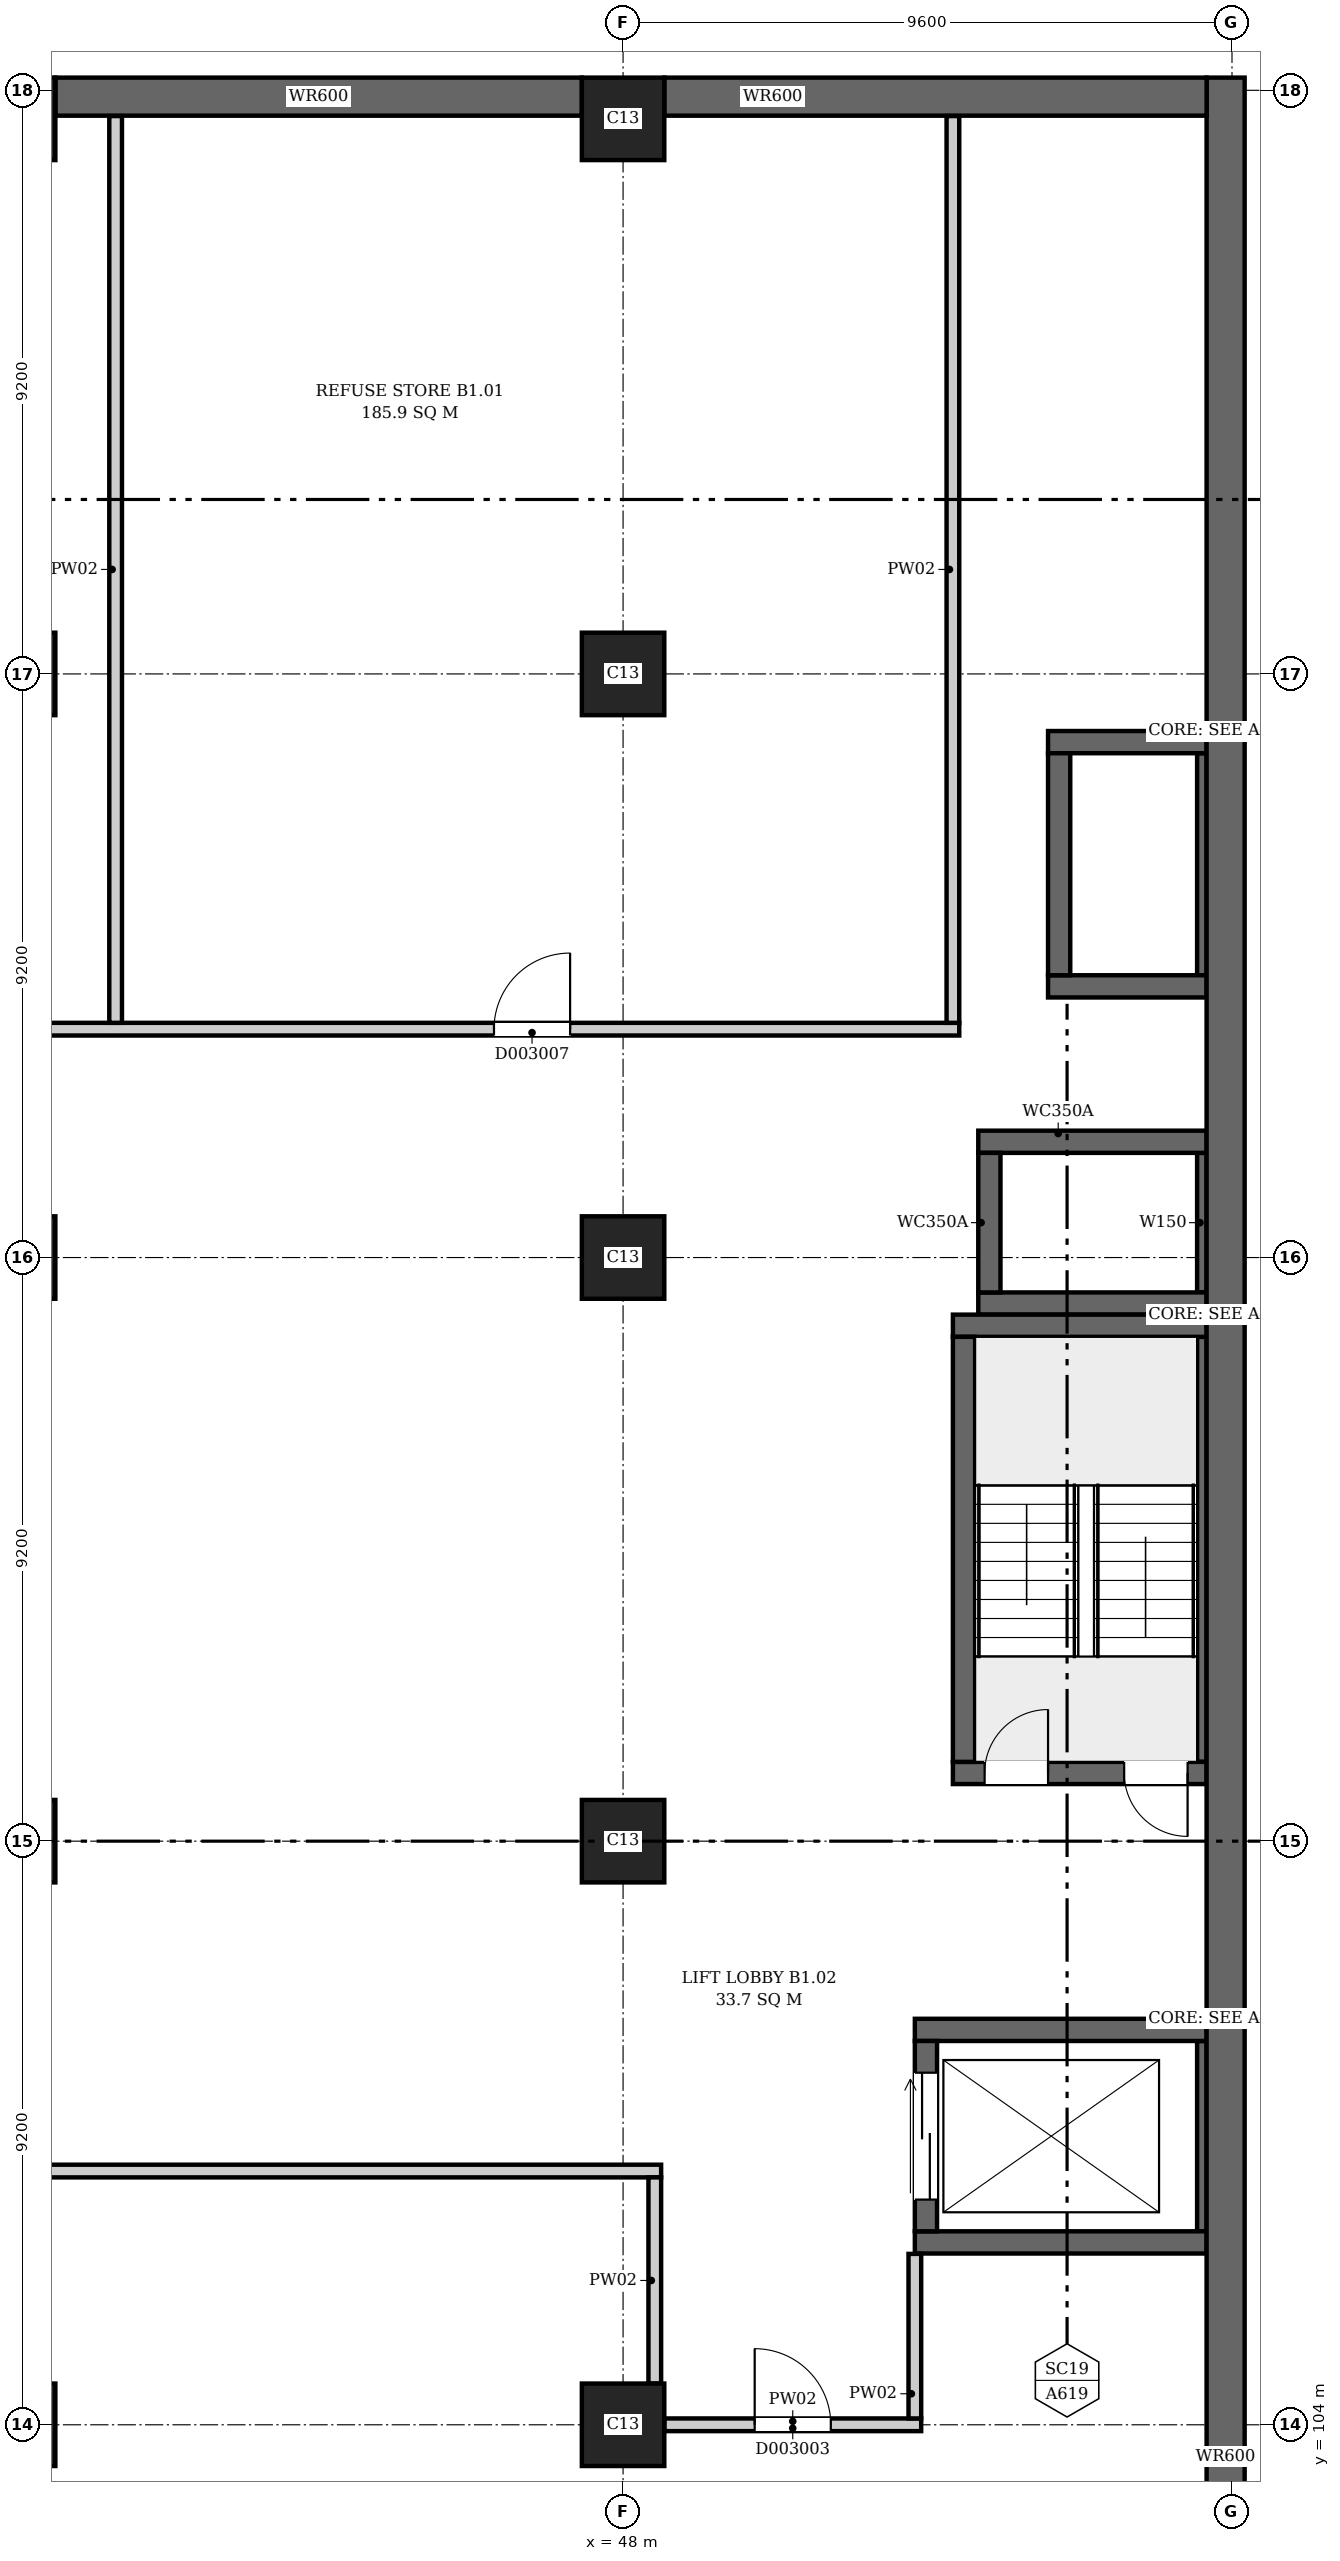
"""IFC4 building model, lengths in metres.
Left out: names, types, materials, properties, quantities, classifications, styles, units other than length and angle.
Written with IfcOpenShell. Run it as: python <this file> out.ifc"""

import sys

from ifc_helpers import new_model, si_unit, direction, frame, frame_2d, origin, origin_2d, place, context, subcontext, project, spatial, rectangle, extrude, element, fill, save


model = new_model("IFC4")
c1 = context("Model", 3, precision=1e-05, world=origin(), true_north=direction((0.0, 1.0)))
c2 = subcontext(c1, "Body", "Model", "MODEL_VIEW")
j1 = project(units=[si_unit("LENGTHUNIT", "METRE"), si_unit("PLANEANGLEUNIT", "RADIAN")], contexts=[c1])
p1 = place(None, origin())
s1 = spatial("IfcSite", under=j1, at=p1, CompositionType="ELEMENT")
p2 = place(p1, origin())
s2 = spatial("IfcBuilding", under=s1, at=p2, CompositionType="ELEMENT")
p3 = place(p2, frame((0.0, 0.0, -5.5)))
s3 = spatial("IfcBuildingStorey", under=s2, at=p3, CompositionType="ELEMENT", Elevation=-5.5)
p4 = place(p3, frame((57.5, 94.12, 0.0), z_axis=(0.0, 0.0, 1.0), x_axis=(0.0, 1.0, 0.0)))
e1 = element("IfcWall", 1, at=p4, inside=s3, PredefinedType="SOLIDWALL", context=c2, shape_type="SweptSolid", body=[
    extrude(rectangle(XDim=46.88, YDim=0.6, at=frame_2d((23.44, 0.0))), origin(), (0.0, 0.0, 1.0), 5.5),
])
p5 = place(p3, frame((39.05, 140.7, 0.0), z_axis=(0.0, 0.0, 1.0), x_axis=(1.0, 0.0, 0.0)))
e2 = element("IfcWall", 2, at=p5, inside=s3, PredefinedType="SOLIDWALL", context=c2, shape_type="SweptSolid", body=[
    extrude(rectangle(XDim=8.3, YDim=0.6, at=frame_2d((4.15, 0.0))), origin(), (0.0, 0.0, 1.0), 5.5),
])
p6 = place(p3, frame((48.65, 140.7, 0.0), z_axis=(0.0, 0.0, 1.0), x_axis=(1.0, 0.0, 0.0)))
e3 = element("IfcWall", 3, at=p6, inside=s3, PredefinedType="SOLIDWALL", context=c2, shape_type="SweptSolid", body=[
    extrude(rectangle(XDim=8.55, YDim=0.6, at=frame_2d((4.275, 0.0))), origin(), (0.0, 0.0, 1.0), 5.5),
])
p7 = place(p3, frame((53.2, 114.275, 0.0), z_axis=(0.0, 0.0, 1.0), x_axis=(1.0, 0.0, 0.0)))
e4 = element("IfcWall", 4, at=p7, inside=s3, PredefinedType="SHEAR", context=c2, shape_type="SweptSolid", body=[
    extrude(rectangle(XDim=4.0, YDim=0.35, at=frame_2d((2.0, 0.0))), origin(), (0.0, 0.0, 1.0), 5.5),
])
p8 = place(p7, frame((0.5, 0.0, 0.0)))
e5 = element("IfcOpeningElement", 5, at=p8, cuts=e4, PredefinedType="OPENING", context=c2, shape_type="SweptSolid", body=[
    extrude(rectangle(XDim=1.0, YDim=2.1, at=frame_2d((0.5, 1.05))), frame((0.0, 0.185, 0.0), z_axis=(0.0, -1.0, 0.0), x_axis=(1.0, 0.0, 0.0)), (0.0, 0.0, 1.0), 0.37),
])
p9 = place(p7, frame((2.7, 0.0, 0.0)))
e6 = element("IfcOpeningElement", 6, at=p9, cuts=e4, PredefinedType="OPENING", context=c2, shape_type="SweptSolid", body=[
    extrude(rectangle(XDim=1.0, YDim=2.1, at=frame_2d((0.5, 1.05))), frame((0.0, 0.185, 0.0), z_axis=(0.0, -1.0, 0.0), x_axis=(1.0, 0.0, 0.0)), (0.0, 0.0, 1.0), 0.37),
])
p10 = place(p3, frame((53.2, 121.325, 0.0), z_axis=(0.0, 0.0, 1.0), x_axis=(1.0, 0.0, 0.0)))
e7 = element("IfcWall", 7, at=p10, inside=s3, PredefinedType="SHEAR", context=c2, shape_type="SweptSolid", body=[
    extrude(rectangle(XDim=4.0, YDim=0.35, at=frame_2d((2.0, 0.0))), origin(), (0.0, 0.0, 1.0), 5.5),
])
p11 = place(p3, frame((53.375, 114.45, 0.0), z_axis=(0.0, 0.0, 1.0), x_axis=(0.0, 1.0, 0.0)))
e8 = element("IfcWall", 8, at=p11, inside=s3, PredefinedType="SHEAR", context=c2, shape_type="SweptSolid", body=[
    extrude(rectangle(XDim=6.7, YDim=0.35, at=frame_2d((3.35, 0.0))), origin(), (0.0, 0.0, 1.0), 5.5),
])
p12 = place(p3, frame((57.125, 114.45, 0.0), z_axis=(0.0, 0.0, 1.0), x_axis=(0.0, 1.0, 0.0)))
e9 = element("IfcWall", 9, at=p12, inside=s3, PredefinedType="SHEAR", context=c2, shape_type="SweptSolid", body=[
    extrude(rectangle(XDim=6.7, YDim=0.15, at=frame_2d((3.35, 0.0))), origin(), (0.0, 0.0, 1.0), 5.5),
])
for number, where, z_axis, x_axis in (
    (10, (53.6, 121.675, 0.0), (0.0, 0.0, 1.0), (1.0, 0.0, 0.0)),
    (11, (53.6, 124.225, 0.0), (0.0, 0.0, 1.0), (1.0, 0.0, 0.0)),
):
    element("IfcWall", number, at=place(p3, frame(where, z_axis=z_axis, x_axis=x_axis)), inside=s3, PredefinedType="SHEAR", context=c2, shape_type="SweptSolid", body=[
        extrude(rectangle(XDim=3.6, YDim=0.35, at=frame_2d((1.8, 0.0))), origin(), (0.0, 0.0, 1.0), 5.5),
    ])
p13 = place(p3, frame((53.775, 121.85, 0.0), z_axis=(0.0, 0.0, 1.0), x_axis=(0.0, 1.0, 0.0)))
e12 = element("IfcWall", 12, at=p13, inside=s3, PredefinedType="SHEAR", context=c2, shape_type="SweptSolid", body=[
    extrude(rectangle(XDim=2.2, YDim=0.35, at=frame_2d((1.1, 0.0))), origin(), (0.0, 0.0, 1.0), 5.5),
])
p14 = place(p3, frame((57.125, 121.85, 0.0), z_axis=(0.0, 0.0, 1.0), x_axis=(0.0, 1.0, 0.0)))
e13 = element("IfcWall", 13, at=p14, inside=s3, PredefinedType="SHEAR", context=c2, shape_type="SweptSolid", body=[
    extrude(rectangle(XDim=2.2, YDim=0.15, at=frame_2d((1.1, 0.0))), origin(), (0.0, 0.0, 1.0), 5.5),
])
for number, where, z_axis, x_axis in (
    (14, (52.6, 106.875, -1.6), (0.0, 0.0, 1.0), (1.0, 0.0, 0.0)),
    (15, (52.6, 110.225, -1.6), (0.0, 0.0, 1.0), (1.0, 0.0, 0.0)),
):
    element("IfcWall", number, at=place(p3, frame(where, z_axis=z_axis, x_axis=x_axis)), inside=s3, PredefinedType="SHEAR", context=c2, shape_type="SweptSolid", body=[
        extrude(rectangle(XDim=4.6, YDim=0.35, at=frame_2d((2.3, 0.0))), origin(), (0.0, 0.0, 1.0), 7.1),
    ])
p15 = place(p3, frame((52.775, 107.05, -1.6), z_axis=(0.0, 0.0, 1.0), x_axis=(0.0, 1.0, 0.0)))
e16 = element("IfcWall", 16, at=p15, inside=s3, PredefinedType="SHEAR", context=c2, shape_type="SweptSolid", body=[
    extrude(rectangle(XDim=3.0, YDim=0.35, at=frame_2d((1.5, 0.0))), origin(), (0.0, 0.0, 1.0), 7.1),
])
p16 = place(p15, frame((0.5, 0.0, 1.6)))
e17 = element("IfcOpeningElement", 17, at=p16, cuts=e16, PredefinedType="OPENING", context=c2, shape_type="SweptSolid", body=[
    extrude(rectangle(XDim=2.0, YDim=2.4, at=frame_2d((1.0, 1.2))), frame((0.0, 0.185, 0.0), z_axis=(0.0, -1.0, 0.0), x_axis=(1.0, 0.0, 0.0)), (0.0, 0.0, 1.0), 0.37),
])
p17 = place(p3, frame((57.125, 107.05, -1.6), z_axis=(0.0, 0.0, 1.0), x_axis=(0.0, 1.0, 0.0)))
e18 = element("IfcWall", 18, at=p17, inside=s3, PredefinedType="SHEAR", context=c2, shape_type="SweptSolid", body=[
    extrude(rectangle(XDim=3.0, YDim=0.15, at=frame_2d((1.5, 0.0))), origin(), (0.0, 0.0, 1.0), 7.1),
])
for number, where, z_axis, x_axis in (
    (19, (54.7, 126.675, 0.0), (0.0, 0.0, 1.0), (1.0, 0.0, 0.0)),
    (20, (54.7, 130.525, 0.0), (0.0, 0.0, 1.0), (1.0, 0.0, 0.0)),
):
    element("IfcWall", number, at=place(p3, frame(where, z_axis=z_axis, x_axis=x_axis)), inside=s3, PredefinedType="SHEAR", context=c2, shape_type="SweptSolid", body=[
        extrude(rectangle(XDim=2.5, YDim=0.35, at=frame_2d((1.25, 0.0))), origin(), (0.0, 0.0, 1.0), 5.5),
    ])
p18 = place(p3, frame((54.875, 126.85, 0.0), z_axis=(0.0, 0.0, 1.0), x_axis=(0.0, 1.0, 0.0)))
e21 = element("IfcWall", 21, at=p18, inside=s3, PredefinedType="SHEAR", context=c2, shape_type="SweptSolid", body=[
    extrude(rectangle(XDim=3.5, YDim=0.35, at=frame_2d((1.75, 0.0))), origin(), (0.0, 0.0, 1.0), 5.5),
])
p19 = place(p3, frame((57.125, 126.85, 0.0), z_axis=(0.0, 0.0, 1.0), x_axis=(0.0, 1.0, 0.0)))
e22 = element("IfcWall", 22, at=p19, inside=s3, PredefinedType="SHEAR", context=c2, shape_type="SweptSolid", body=[
    extrude(rectangle(XDim=3.5, YDim=0.15, at=frame_2d((1.75, 0.0))), origin(), (0.0, 0.0, 1.0), 5.5),
])
for number, where, z_axis, x_axis in (
    (23, (38.4, 104.0, 0.0), (0.0, 0.0, 1.0), (1.0, 0.0, 0.0)),
    (24, (48.0, 104.0, 0.0), (0.0, 0.0, 1.0), (1.0, 0.0, 0.0)),
    (25, (38.4, 113.2, 0.0), (0.0, 0.0, 1.0), (1.0, 0.0, 0.0)),
    (26, (48.0, 113.2, 0.0), (0.0, 0.0, 1.0), (1.0, 0.0, 0.0)),
    (27, (38.4, 122.4, 0.0), (0.0, 0.0, 1.0), (1.0, 0.0, 0.0)),
    (28, (48.0, 122.4, 0.0), (0.0, 0.0, 1.0), (1.0, 0.0, 0.0)),
    (29, (38.4, 131.6, 0.0), (0.0, 0.0, 1.0), (1.0, 0.0, 0.0)),
    (30, (48.0, 131.6, 0.0), (0.0, 0.0, 1.0), (1.0, 0.0, 0.0)),
    (31, (38.4, 140.35, 0.0), (0.0, 0.0, 1.0), (1.0, 0.0, 0.0)),
    (32, (48.0, 140.35, 0.0), (0.0, 0.0, 1.0), (1.0, 0.0, 0.0)),
):
    element("IfcColumn", number, at=place(p3, frame(where, z_axis=z_axis, x_axis=x_axis)), inside=s3, PredefinedType="COLUMN", context=c2, shape_type="SweptSolid", body=[
        extrude(rectangle(XDim=1.3, YDim=1.3, at=origin_2d()), origin(), (0.0, 0.0, 1.0), 5.5),
    ])
p20 = place(p3, frame((4.3, 126.0, 0.0), z_axis=(0.0, 0.0, 1.0), x_axis=(1.0, 0.0, 0.0)))
e33 = element("IfcWall", 33, at=p20, inside=s3, PredefinedType="PARTITIONING", context=c2, shape_type="SweptSolid", body=[
    extrude(rectangle(XDim=49.0, YDim=0.2, at=frame_2d((24.5, 0.0))), origin(), (0.0, 0.0, 1.0), 5.15),
])
p21 = place(p20, frame((6.935, 0.0, 0.0)))
e34 = element("IfcOpeningElement", 34, at=p21, cuts=e33, PredefinedType="OPENING", context=c2, shape_type="SweptSolid", body=[
    extrude(rectangle(XDim=1.2, YDim=2.1, at=frame_2d((0.6, 1.05))), frame((0.0, 0.11, 0.0), z_axis=(0.0, -1.0, 0.0), x_axis=(1.0, 0.0, 0.0)), (0.0, 0.0, 1.0), 0.22),
])
p22 = place(p20, frame((19.1, 0.0, 0.0)))
e35 = element("IfcOpeningElement", 35, at=p22, cuts=e33, PredefinedType="OPENING", context=c2, shape_type="SweptSolid", body=[
    extrude(rectangle(XDim=1.2, YDim=2.1, at=frame_2d((0.6, 1.05))), frame((0.0, 0.11, 0.0), z_axis=(0.0, -1.0, 0.0), x_axis=(1.0, 0.0, 0.0)), (0.0, 0.0, 1.0), 0.22),
])
p23 = place(p20, frame((29.5, 0.0, 0.0)))
e36 = element("IfcOpeningElement", 36, at=p23, cuts=e33, PredefinedType="OPENING", context=c2, shape_type="SweptSolid", body=[
    extrude(rectangle(XDim=1.2, YDim=2.1, at=frame_2d((0.6, 1.05))), frame((0.0, 0.11, 0.0), z_axis=(0.0, -1.0, 0.0), x_axis=(1.0, 0.0, 0.0)), (0.0, 0.0, 1.0), 0.22),
])
p24 = place(p20, frame((41.665, 0.0, 0.0)))
e37 = element("IfcOpeningElement", 37, at=p24, cuts=e33, PredefinedType="OPENING", context=c2, shape_type="SweptSolid", body=[
    extrude(rectangle(XDim=1.2, YDim=2.1, at=frame_2d((0.6, 1.05))), frame((0.0, 0.11, 0.0), z_axis=(0.0, -1.0, 0.0), x_axis=(1.0, 0.0, 0.0)), (0.0, 0.0, 1.0), 0.22),
])
p25 = place(p3, frame((19.1, 108.0, 0.0), z_axis=(0.0, 0.0, 1.0), x_axis=(1.0, 0.0, 0.0)))
e38 = element("IfcWall", 38, at=p25, inside=s3, PredefinedType="PARTITIONING", context=c2, shape_type="SweptSolid", body=[
    extrude(rectangle(XDim=29.5, YDim=0.2, at=frame_2d((14.75, 0.0))), origin(), (0.0, 0.0, 1.0), 5.15),
])
p26 = place(p25, frame((9.135, 0.0, 0.0)))
e39 = element("IfcOpeningElement", 39, at=p26, cuts=e38, PredefinedType="OPENING", context=c2, shape_type="SweptSolid", body=[
    extrude(rectangle(XDim=1.2, YDim=2.1, at=frame_2d((0.6, 1.05))), frame((0.0, 0.11, 0.0), z_axis=(0.0, -1.0, 0.0), x_axis=(1.0, 0.0, 0.0)), (0.0, 0.0, 1.0), 0.22),
])
p27 = place(p3, frame((40.0, 126.1, 0.0), z_axis=(0.0, 0.0, 1.0), x_axis=(0.0, 1.0, 0.0)))
e40 = element("IfcWall", 40, at=p27, inside=s3, PredefinedType="PARTITIONING", context=c2, shape_type="SweptSolid", body=[
    extrude(rectangle(XDim=14.294, YDim=0.2, at=frame_2d((7.147, 0.0))), origin(), (0.0, 0.0, 1.0), 5.15),
])
p28 = place(p3, frame((48.5, 104.65, 0.0), z_axis=(0.0, 0.0, 1.0), x_axis=(0.0, 1.0, 0.0)))
e41 = element("IfcWall", 41, at=p28, inside=s3, PredefinedType="PARTITIONING", context=c2, shape_type="SweptSolid", body=[
    extrude(rectangle(XDim=3.25, YDim=0.2, at=frame_2d((1.625, 0.0))), origin(), (0.0, 0.0, 1.0), 5.15),
])
p29 = place(p3, frame((48.65, 104.0, 0.0), z_axis=(0.0, 0.0, 1.0), x_axis=(1.0, 0.0, 0.0)))
e42 = element("IfcWall", 42, at=p29, inside=s3, PredefinedType="PARTITIONING", context=c2, shape_type="SweptSolid", body=[
    extrude(rectangle(XDim=4.05, YDim=0.2, at=frame_2d((2.025, 0.0))), origin(), (0.0, 0.0, 1.0), 5.15),
])
p30 = place(p29, frame((1.425, 0.0, 0.0)))
e43 = element("IfcOpeningElement", 43, at=p30, cuts=e42, PredefinedType="OPENING", context=c2, shape_type="SweptSolid", body=[
    extrude(rectangle(XDim=1.2, YDim=2.1, at=frame_2d((0.6, 1.05))), frame((0.0, 0.11, 0.0), z_axis=(0.0, -1.0, 0.0), x_axis=(1.0, 0.0, 0.0)), (0.0, 0.0, 1.0), 0.22),
])
p31 = place(p3, frame((52.6, 104.1, 0.0), z_axis=(0.0, 0.0, 1.0), x_axis=(0.0, 1.0, 0.0)))
e44 = element("IfcWall", 44, at=p31, inside=s3, PredefinedType="PARTITIONING", context=c2, shape_type="SweptSolid", body=[
    extrude(rectangle(XDim=2.594, YDim=0.2, at=frame_2d((1.297, 0.0))), origin(), (0.0, 0.0, 1.0), 5.15),
])
p32 = place(p3, frame((53.2, 126.1, 0.0), z_axis=(0.0, 0.0, 1.0), x_axis=(0.0, 1.0, 0.0)))
e45 = element("IfcWall", 45, at=p32, inside=s3, PredefinedType="PARTITIONING", context=c2, shape_type="SweptSolid", body=[
    extrude(rectangle(XDim=14.294, YDim=0.2, at=frame_2d((7.147, 0.0))), origin(), (0.0, 0.0, 1.0), 5.15),
])
p33 = place(p8, origin())
e46 = element("IfcDoor", 46, at=p33, inside=s3, OperationType="SINGLE_SWING_RIGHT", PredefinedType="DOOR", context=c2, shape_type="SweptSolid", body=[
    extrude(rectangle(XDim=1.0, YDim=2.1, at=frame_2d((0.5, 1.05))), frame((0.0, 0.025, 0.0), z_axis=(0.0, -1.0, 0.0), x_axis=(1.0, 0.0, 0.0)), (0.0, 0.0, 1.0), 0.05),
])
fill(e5, e46)
p34 = place(p9, origin())
e47 = element("IfcDoor", 47, at=p34, inside=s3, OperationType="SINGLE_SWING_LEFT", PredefinedType="DOOR", context=c2, shape_type="SweptSolid", body=[
    extrude(rectangle(XDim=1.0, YDim=2.1, at=frame_2d((0.5, 1.05))), frame((0.0, 0.025, 0.0), z_axis=(0.0, -1.0, 0.0), x_axis=(1.0, 0.0, 0.0)), (0.0, 0.0, 1.0), 0.05),
])
fill(e6, e47)
p35 = place(p16, origin())
e48 = element("IfcDoor", 48, at=p35, inside=s3, OperationType="DOUBLE_DOOR_SLIDING", PredefinedType="DOOR", context=c2, shape_type="SweptSolid", body=[
    extrude(rectangle(XDim=2.0, YDim=2.4, at=frame_2d((1.0, 1.2))), frame((0.0, 0.025, 0.0), z_axis=(0.0, -1.0, 0.0), x_axis=(1.0, 0.0, 0.0)), (0.0, 0.0, 1.0), 0.05),
])
fill(e17, e48)
p36 = place(p30, origin())
e49 = element("IfcDoor", 49, at=p36, inside=s3, OperationType="SINGLE_SWING_LEFT", PredefinedType="DOOR", context=c2, shape_type="SweptSolid", body=[
    extrude(rectangle(XDim=1.2, YDim=2.1, at=frame_2d((0.6, 1.05))), frame((0.0, 0.025, 0.0), z_axis=(0.0, -1.0, 0.0), x_axis=(1.0, 0.0, 0.0)), (0.0, 0.0, 1.0), 0.05),
])
fill(e43, e49)
p37 = place(p24, origin())
e50 = element("IfcDoor", 50, at=p37, inside=s3, OperationType="SINGLE_SWING_RIGHT", PredefinedType="DOOR", context=c2, shape_type="SweptSolid", body=[
    extrude(rectangle(XDim=1.2, YDim=2.1, at=frame_2d((0.6, 1.05))), frame((0.0, 0.025, 0.0), z_axis=(0.0, -1.0, 0.0), x_axis=(1.0, 0.0, 0.0)), (0.0, 0.0, 1.0), 0.05),
])
fill(e37, e50)
save(model, sys.argv[1])
